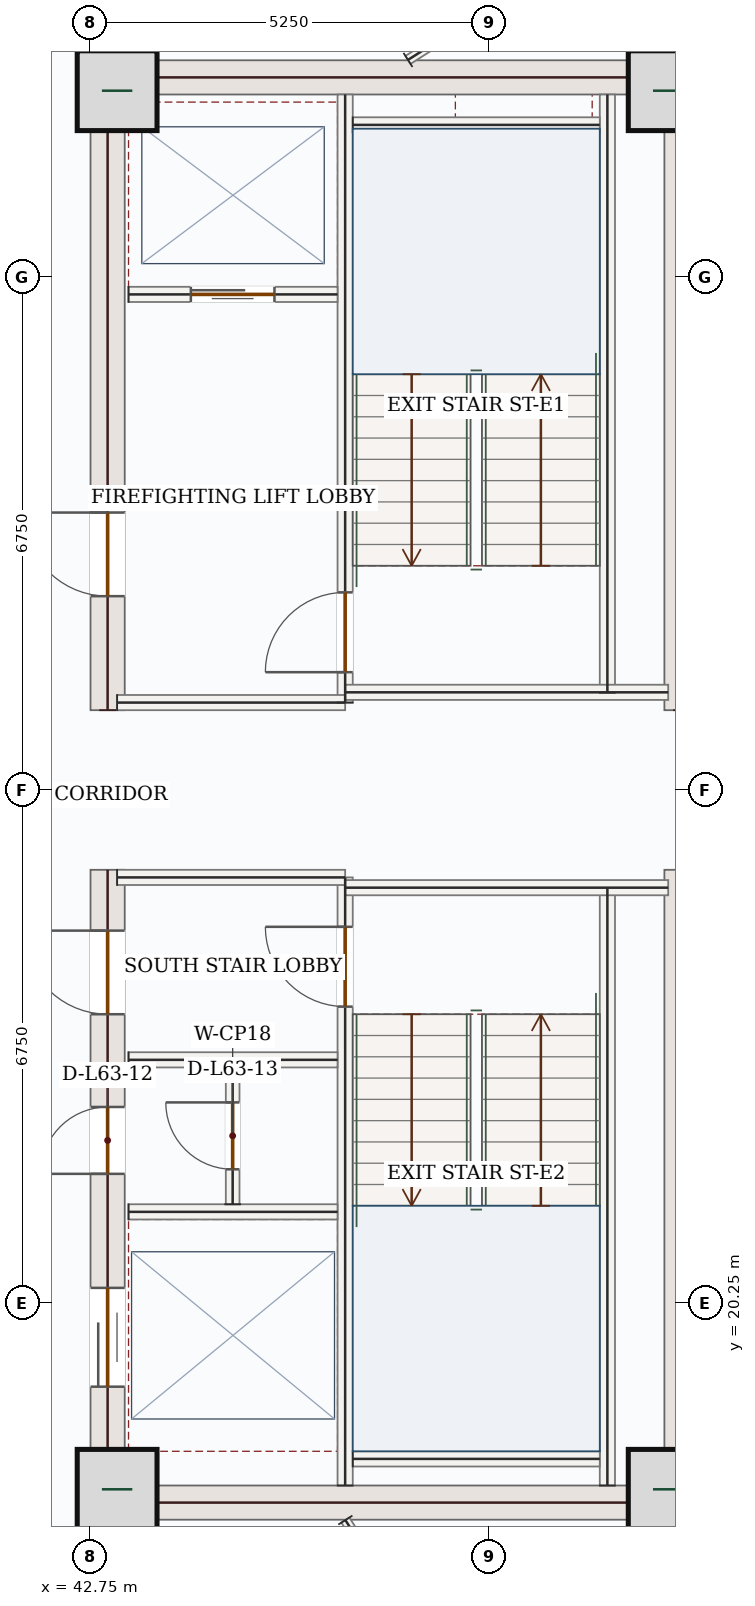
"""IFC4 building model, lengths in metres.
Left out: names, types, materials, properties, quantities, classifications, styles, units other than length and angle.
Written with IfcOpenShell. Run it as: python <this file> out.ifc"""

import sys

from ifc_helpers import new_model, si_unit, direction, frame, frame_2d, origin, origin_2d, place, context, subcontext, project, spatial, rectangle, extrude, source, transform, mapped, element, fill, save


model = new_model("IFC4")
c1 = context("Model", 3, precision=1e-05, world=origin(), true_north=direction((0.0, 1.0)))
c2 = subcontext(c1, "Body", "Model", "MODEL_VIEW")
j1 = project(units=[si_unit("LENGTHUNIT", "METRE"), si_unit("PLANEANGLEUNIT", "RADIAN")], contexts=[c1])
p1 = place(None, origin())
s1 = spatial("IfcSite", under=j1, at=p1, CompositionType="ELEMENT")
p2 = place(p1, origin())
s2 = spatial("IfcBuilding", under=s1, at=p2, CompositionType="ELEMENT")
p3 = place(p2, frame((0.0, 0.0, 265.35)))
s3 = spatial("IfcBuildingStorey", under=s2, at=p3, CompositionType="ELEMENT", Elevation=265.35)
p4 = place(p3, frame((42.975, 17.4, 0.0), z_axis=(0.0, 0.0, 1.0), x_axis=(0.0, 1.0, 0.0)))
e1 = element("IfcWall", 1, at=p4, inside=s3, PredefinedType="SHEAR", context=c2, shape_type="SweptSolid", body=[
    extrude(rectangle(XDim=8.55, YDim=0.45, at=frame_2d((4.275, 0.0))), origin(), (0.0, 0.0, 1.0), 3.5),
])
p5 = place(p4, frame((6.65, 0.0, 0.0)))
e2 = element("IfcOpeningElement", 2, at=p5, cuts=e1, PredefinedType="OPENING", context=c2, shape_type="SweptSolid", body=[
    extrude(rectangle(XDim=1.1, YDim=2.2, at=frame_2d((0.55, 1.1))), frame((0.0, 0.235, 0.0), z_axis=(0.0, -1.0, 0.0), x_axis=(1.0, 0.0, 0.0)), (0.0, 0.0, 1.0), 0.47),
])
p6 = place(p4, frame((1.75, 0.0, 0.0)))
e3 = element("IfcOpeningElement", 3, at=p6, cuts=e1, PredefinedType="OPENING", context=c2, shape_type="SweptSolid", body=[
    extrude(rectangle(XDim=1.3, YDim=2.2, at=frame_2d((0.65, 1.1))), frame((0.0, 0.235, 0.0), z_axis=(0.0, -1.0, 0.0), x_axis=(1.0, 0.0, 0.0)), (0.0, 0.0, 1.0), 0.47),
])
p7 = place(p4, frame((4.55, 0.0, 0.0)))
e4 = element("IfcOpeningElement", 4, at=p7, cuts=e1, PredefinedType="OPENING", context=c2, shape_type="SweptSolid", body=[
    extrude(rectangle(XDim=0.88, YDim=2.1, at=frame_2d((0.44, 1.05))), frame((0.0, 0.235, 0.0), z_axis=(0.0, -1.0, 0.0), x_axis=(1.0, 0.0, 0.0)), (0.0, 0.0, 1.0), 0.47),
])
p8 = place(p3, frame((42.975, 28.05, 0.0), z_axis=(0.0, 0.0, 1.0), x_axis=(0.0, 1.0, 0.0)))
e5 = element("IfcWall", 5, at=p8, inside=s3, PredefinedType="SHEAR", context=c2, shape_type="SweptSolid", body=[
    extrude(rectangle(XDim=8.55, YDim=0.45, at=frame_2d((4.275, 0.0))), origin(), (0.0, 0.0, 1.0), 3.5),
])
p9 = place(p8, frame((1.5, 0.0, 0.0)))
e6 = element("IfcOpeningElement", 6, at=p9, cuts=e5, PredefinedType="OPENING", context=c2, shape_type="SweptSolid", body=[
    extrude(rectangle(XDim=1.1, YDim=2.2, at=frame_2d((0.55, 1.1))), frame((0.0, 0.235, 0.0), z_axis=(0.0, -1.0, 0.0), x_axis=(1.0, 0.0, 0.0)), (0.0, 0.0, 1.0), 0.47),
])
m1 = source(origin(), c2, "Body", "SweptSolid", [
    extrude(rectangle(XDim=8.55, YDim=0.45, at=frame_2d((4.275, 0.0))), origin(), (0.0, 0.0, 1.0), 3.5),
])
for number, where, z_axis, x_axis in (
    (7, (50.525, 17.4, 0.0), (0.0, 0.0, 1.0), (0.0, 1.0, 0.0)),
    (8, (50.525, 28.05, 0.0), (0.0, 0.0, 1.0), (0.0, 1.0, 0.0)),
):
    element("IfcWall", number, at=place(p3, frame(where, z_axis=z_axis, x_axis=x_axis)), inside=s3, PredefinedType="SHEAR", context=c2, shape_type="MappedRepresentation", body=[
        mapped(m1, transform((0.0, 0.0, 0.0), x_axis=(1.0, 0.0, 0.0), y_axis=(0.0, 1.0, 0.0), z_axis=(0.0, 0.0, 1.0), scale=1.0)),
    ])
m2 = source(origin(), c2, "Body", "SweptSolid", [
    extrude(rectangle(XDim=7.1, YDim=0.45, at=frame_2d((3.55, 0.0))), origin(), (0.0, 0.0, 1.0), 3.5),
])
for number, where, z_axis, x_axis in (
    (9, (43.2, 17.625, 0.0), (0.0, 0.0, 1.0), (1.0, 0.0, 0.0)),
    (10, (43.2, 36.375, 0.0), (0.0, 0.0, 1.0), (1.0, 0.0, 0.0)),
):
    element("IfcWall", number, at=place(p3, frame(where, z_axis=z_axis, x_axis=x_axis)), inside=s3, PredefinedType="SHEAR", context=c2, shape_type="MappedRepresentation", body=[
        mapped(m2, transform((0.0, 0.0, 0.0), x_axis=(1.0, 0.0, 0.0), y_axis=(0.0, 1.0, 0.0), z_axis=(0.0, 0.0, 1.0), scale=1.0)),
    ])
m3 = source(origin(), c2, "Body", "SweptSolid", [
    extrude(rectangle(XDim=1.05, YDim=1.05, at=origin_2d()), origin(), (0.0, 0.0, 1.0), 3.75),
])
for number, where, z_axis, x_axis in (
    (11, (43.1, 17.8, 0.0), (0.0, 0.0, 1.0), (1.0, 0.0, 0.0)),
    (12, (50.35, 17.8, 0.0), (0.0, 0.0, 1.0), (1.0, 0.0, 0.0)),
    (13, (43.1, 36.2, 0.0), (0.0, 0.0, 1.0), (1.0, 0.0, 0.0)),
    (14, (50.35, 36.2, 0.0), (0.0, 0.0, 1.0), (1.0, 0.0, 0.0)),
):
    element("IfcColumn", number, at=place(p3, frame(where, z_axis=z_axis, x_axis=x_axis)), inside=s3, PredefinedType="COLUMN", context=c2, shape_type="MappedRepresentation", body=[
        mapped(m3, transform((0.0, 0.0, 0.0), x_axis=(1.0, 0.0, 0.0), y_axis=(0.0, 1.0, 0.0), z_axis=(0.0, 0.0, 1.0), scale=1.0)),
    ])
m4 = source(origin(), c2, "Body", "SweptSolid", [
    extrude(rectangle(XDim=7.87, YDim=0.2, at=frame_2d((3.935, 0.0))), origin(), (0.0, 0.0, 1.0), 3.5),
])
for number, where, z_axis, x_axis in (
    (15, (49.55, 17.85, 0.0), (0.0, 0.0, 1.0), (0.0, 1.0, 0.0)),
    (16, (49.55, 28.28, 0.0), (0.0, 0.0, 1.0), (0.0, 1.0, 0.0)),
):
    element("IfcWall", number, at=place(p3, frame(where, z_axis=z_axis, x_axis=x_axis)), inside=s3, PredefinedType="SOLIDWALL", context=c2, shape_type="MappedRepresentation", body=[
        mapped(m4, transform((0.0, 0.0, 0.0), x_axis=(1.0, 0.0, 0.0), y_axis=(0.0, 1.0, 0.0), z_axis=(0.0, 0.0, 1.0), scale=1.0)),
    ])
p10 = place(p3, frame((46.1, 17.85, 0.0), z_axis=(0.0, 0.0, 1.0), x_axis=(0.0, 1.0, 0.0)))
e17 = element("IfcWall", 17, at=p10, inside=s3, PredefinedType="SOLIDWALL", context=c2, shape_type="SweptSolid", body=[
    extrude(rectangle(XDim=8.0, YDim=0.2, at=frame_2d((4.0, 0.0))), origin(), (0.0, 0.0, 1.0), 3.5),
])
p11 = place(p10, frame((6.3, 0.0, 0.0)))
e18 = element("IfcOpeningElement", 18, at=p11, cuts=e17, PredefinedType="OPENING", context=c2, shape_type="SweptSolid", body=[
    extrude(rectangle(XDim=1.05, YDim=2.15, at=frame_2d((0.525, 1.075))), frame((0.0, 0.11, 0.0), z_axis=(0.0, -1.0, 0.0), x_axis=(1.0, 0.0, 0.0)), (0.0, 0.0, 1.0), 0.22),
])
p12 = place(p3, frame((46.1, 28.15, 0.0), z_axis=(0.0, 0.0, 1.0), x_axis=(0.0, 1.0, 0.0)))
e19 = element("IfcWall", 19, at=p12, inside=s3, PredefinedType="SOLIDWALL", context=c2, shape_type="SweptSolid", body=[
    extrude(rectangle(XDim=8.0, YDim=0.2, at=frame_2d((4.0, 0.0))), origin(), (0.0, 0.0, 1.0), 3.5),
])
p13 = place(p12, frame((0.4, 0.0, 0.0)))
e20 = element("IfcOpeningElement", 20, at=p13, cuts=e19, PredefinedType="OPENING", context=c2, shape_type="SweptSolid", body=[
    extrude(rectangle(XDim=1.05, YDim=2.15, at=frame_2d((0.525, 1.075))), frame((0.0, 0.11, 0.0), z_axis=(0.0, -1.0, 0.0), x_axis=(1.0, 0.0, 0.0)), (0.0, 0.0, 1.0), 0.22),
])
m5 = source(origin(), c2, "Body", "SweptSolid", [
    extrude(rectangle(XDim=3.0, YDim=0.2, at=frame_2d((1.5, 0.0))), origin(), (0.0, 0.0, 1.0), 3.5),
])
p14 = place(p3, frame((43.1, 25.85, 0.0), z_axis=(0.0, 0.0, 1.0), x_axis=(1.0, 0.0, 0.0)))
e21 = element("IfcWall", 21, at=p14, inside=s3, PredefinedType="SOLIDWALL", context=c2, shape_type="MappedRepresentation", body=[
    mapped(m5, transform((0.0, 0.0, 0.0), x_axis=(1.0, 0.0, 0.0), y_axis=(0.0, 1.0, 0.0), z_axis=(0.0, 0.0, 1.0), scale=1.0)),
])
m6 = source(origin(), c2, "Body", "SweptSolid", [
    extrude(rectangle(XDim=4.25, YDim=0.2, at=frame_2d((2.125, 0.0))), origin(), (0.0, 0.0, 1.0), 3.5),
])
p15 = place(p3, frame((46.1, 25.715, 0.0), z_axis=(0.0, 0.0, 1.0), x_axis=(1.0, 0.0, 0.0)))
e22 = element("IfcWall", 22, at=p15, inside=s3, PredefinedType="SOLIDWALL", context=c2, shape_type="MappedRepresentation", body=[
    mapped(m6, transform((0.0, 0.0, 0.0), x_axis=(1.0, 0.0, 0.0), y_axis=(0.0, 1.0, 0.0), z_axis=(0.0, 0.0, 1.0), scale=1.0)),
])
p16 = place(p3, frame((43.1, 28.15, 0.0), z_axis=(0.0, 0.0, 1.0), x_axis=(1.0, 0.0, 0.0)))
e23 = element("IfcWall", 23, at=p16, inside=s3, PredefinedType="SOLIDWALL", context=c2, shape_type="MappedRepresentation", body=[
    mapped(m5, transform((0.0, 0.0, 0.0), x_axis=(1.0, 0.0, 0.0), y_axis=(0.0, 1.0, 0.0), z_axis=(0.0, 0.0, 1.0), scale=1.0)),
])
p17 = place(p3, frame((46.1, 28.285, 0.0), z_axis=(0.0, 0.0, 1.0), x_axis=(1.0, 0.0, 0.0)))
e24 = element("IfcWall", 24, at=p17, inside=s3, PredefinedType="SOLIDWALL", context=c2, shape_type="MappedRepresentation", body=[
    mapped(m6, transform((0.0, 0.0, 0.0), x_axis=(1.0, 0.0, 0.0), y_axis=(0.0, 1.0, 0.0), z_axis=(0.0, 0.0, 1.0), scale=1.0)),
])
m7 = source(origin(), c2, "Body", "SweptSolid", [
    extrude(rectangle(XDim=3.25, YDim=0.2, at=frame_2d((1.625, 0.0))), origin(), (0.0, 0.0, 1.0), 3.5),
])
for number, where, z_axis, x_axis in (
    (25, (46.2, 35.75, 0.0), (0.0, 0.0, 1.0), (1.0, 0.0, 0.0)),
    (26, (46.2, 18.2, 0.0), (0.0, 0.0, 1.0), (1.0, 0.0, 0.0)),
):
    element("IfcWall", number, at=place(p3, frame(where, z_axis=z_axis, x_axis=x_axis)), inside=s3, PredefinedType="SOLIDWALL", context=c2, shape_type="MappedRepresentation", body=[
        mapped(m7, transform((0.0, 0.0, 0.0), x_axis=(1.0, 0.0, 0.0), y_axis=(0.0, 1.0, 0.0), z_axis=(0.0, 0.0, 1.0), scale=1.0)),
    ])
p18 = place(p3, frame((43.25, 33.52, 0.0), z_axis=(0.0, 0.0, 1.0), x_axis=(1.0, 0.0, 0.0)))
e27 = element("IfcWall", 27, at=p18, inside=s3, PredefinedType="SOLIDWALL", context=c2, shape_type="SweptSolid", body=[
    extrude(rectangle(XDim=2.75, YDim=0.2, at=frame_2d((1.375, 0.0))), origin(), (0.0, 0.0, 1.0), 3.5),
])
p19 = place(p18, frame((0.82, 0.0, 0.0)))
e28 = element("IfcOpeningElement", 28, at=p19, cuts=e27, PredefinedType="OPENING", context=c2, shape_type="SweptSolid", body=[
    extrude(rectangle(XDim=1.1, YDim=2.15, at=frame_2d((0.55, 1.075))), frame((0.0, 0.11, 0.0), z_axis=(0.0, -1.0, 0.0), x_axis=(1.0, 0.0, 0.0)), (0.0, 0.0, 1.0), 0.22),
])
m8 = source(origin(), c2, "Body", "SweptSolid", [
    extrude(rectangle(XDim=2.75, YDim=0.2, at=frame_2d((1.375, 0.0))), origin(), (0.0, 0.0, 1.0), 3.5),
])
for number, where, z_axis, x_axis in (
    (29, (43.25, 23.45, 0.0), (0.0, 0.0, 1.0), (1.0, 0.0, 0.0)),
    (30, (43.25, 21.45, 0.0), (0.0, 0.0, 1.0), (1.0, 0.0, 0.0)),
):
    element("IfcWall", number, at=place(p3, frame(where, z_axis=z_axis, x_axis=x_axis)), inside=s3, PredefinedType="SOLIDWALL", context=c2, shape_type="MappedRepresentation", body=[
        mapped(m8, transform((0.0, 0.0, 0.0), x_axis=(1.0, 0.0, 0.0), y_axis=(0.0, 1.0, 0.0), z_axis=(0.0, 0.0, 1.0), scale=1.0)),
    ])
p20 = place(p3, frame((44.62, 21.55, 0.0), z_axis=(0.0, 0.0, 1.0), x_axis=(0.0, 1.0, 0.0)))
e31 = element("IfcWall", 31, at=p20, inside=s3, PredefinedType="PARTITIONING", context=c2, shape_type="SweptSolid", body=[
    extrude(rectangle(XDim=1.8, YDim=0.18, at=frame_2d((0.9, 0.0))), origin(), (0.0, 0.0, 1.0), 3.5),
])
p21 = place(p20, frame((0.46, 0.0, 0.0)))
e32 = element("IfcOpeningElement", 32, at=p21, cuts=e31, PredefinedType="OPENING", context=c2, shape_type="SweptSolid", body=[
    extrude(rectangle(XDim=0.88, YDim=2.1, at=frame_2d((0.44, 1.05))), frame((0.0, 0.1, 0.0), z_axis=(0.0, -1.0, 0.0), x_axis=(1.0, 0.0, 0.0)), (0.0, 0.0, 1.0), 0.2),
])
p22 = place(p3, frame((46.927, 36.605, 0.0), z_axis=(0.0, 0.0, 1.0), x_axis=(0.843398332862, 0.537288797693, 0.0)))
e33 = element("IfcWall", 33, at=p22, inside=s3, PredefinedType="PARTITIONING", context=c2, shape_type="SweptSolid", body=[
    extrude(rectangle(XDim=5.924, YDim=0.125, at=frame_2d((2.962, 0.0))), origin(), (0.0, 0.0, 1.0), 3.5),
])
p23 = place(p22, frame((2.487, 0.0, 0.0)))
e34 = element("IfcOpeningElement", 34, at=p23, cuts=e33, PredefinedType="OPENING", context=c2, shape_type="SweptSolid", body=[
    extrude(rectangle(XDim=0.95, YDim=2.15, at=frame_2d((0.475, 1.075))), frame((0.0, 0.073, 0.0), z_axis=(0.0, -1.0, 0.0), x_axis=(1.0, 0.0, 0.0)), (0.0, 0.0, 1.0), 0.145),
])
m9 = source(origin(), c2, "Body", "SweptSolid", [
    extrude(rectangle(XDim=5.726, YDim=0.125, at=frame_2d((2.863, 0.0))), origin(), (0.0, 0.0, 1.0), 3.5),
])
p24 = place(p3, frame((46.103, 17.395, 0.0), z_axis=(0.0, 0.0, 1.0), x_axis=(0.537333366959, -0.843369938255, 0.0)))
e35 = element("IfcWall", 35, at=p24, inside=s3, PredefinedType="PARTITIONING", context=c2, shape_type="MappedRepresentation", body=[
    mapped(m9, transform((0.0, 0.0, 0.0), x_axis=(1.0, 0.0, 0.0), y_axis=(0.0, 1.0, 0.0), z_axis=(0.0, 0.0, 1.0), scale=1.0)),
])
m10 = source(origin(), c2, "Body", "SweptSolid", [
    extrude(rectangle(XDim=1.05, YDim=2.15, at=frame_2d((0.525, 1.075))), frame((0.0, 0.025, 0.0), z_axis=(0.0, -1.0, 0.0), x_axis=(1.0, 0.0, 0.0)), (0.0, 0.0, 1.0), 0.05),
])
p25 = place(p13, origin())
e36 = element("IfcDoor", 36, at=p25, inside=s3, OperationType="SINGLE_SWING_LEFT", PredefinedType="DOOR", context=c2, shape_type="MappedRepresentation", body=[
    mapped(m10, transform((0.0, 0.0, 0.0), x_axis=(1.0, 0.0, 0.0), y_axis=(0.0, 1.0, 0.0), z_axis=(0.0, 0.0, 1.0), scale=1.0)),
])
fill(e20, e36)
p26 = place(p11, origin())
e37 = element("IfcDoor", 37, at=p26, inside=s3, OperationType="SINGLE_SWING_RIGHT", PredefinedType="DOOR", context=c2, shape_type="MappedRepresentation", body=[
    mapped(m10, transform((0.0, 0.0, 0.0), x_axis=(1.0, 0.0, 0.0), y_axis=(0.0, 1.0, 0.0), z_axis=(0.0, 0.0, 1.0), scale=1.0)),
])
fill(e18, e37)
m11 = source(origin(), c2, "Body", "SweptSolid", [
    extrude(rectangle(XDim=1.1, YDim=2.15, at=frame_2d((0.55, 1.075))), frame((0.0, 0.025, 0.0), z_axis=(0.0, -1.0, 0.0), x_axis=(1.0, 0.0, 0.0)), (0.0, 0.0, 1.0), 0.05),
])
p27 = place(p19, origin())
e38 = element("IfcDoor", 38, at=p27, inside=s3, OperationType="DOUBLE_DOOR_SLIDING", PredefinedType="DOOR", context=c2, shape_type="MappedRepresentation", body=[
    mapped(m11, transform((0.0, 0.0, 0.0), x_axis=(1.0, 0.0, 0.0), y_axis=(0.0, 1.0, 0.0), z_axis=(0.0, 0.0, 1.0), scale=1.0)),
])
fill(e28, e38)
m12 = source(origin(), c2, "Body", "SweptSolid", [
    extrude(rectangle(XDim=1.1, YDim=2.2, at=frame_2d((0.55, 1.1))), frame((0.0, 0.025, 0.0), z_axis=(0.0, -1.0, 0.0), x_axis=(1.0, 0.0, 0.0)), (0.0, 0.0, 1.0), 0.05),
])
p28 = place(p9, origin())
e39 = element("IfcDoor", 39, at=p28, inside=s3, OperationType="SINGLE_SWING_RIGHT", PredefinedType="DOOR", context=c2, shape_type="MappedRepresentation", body=[
    mapped(m12, transform((0.0, 0.0, 0.0), x_axis=(1.0, 0.0, 0.0), y_axis=(0.0, 1.0, 0.0), z_axis=(0.0, 0.0, 1.0), scale=1.0)),
])
fill(e6, e39)
p29 = place(p5, origin())
e40 = element("IfcDoor", 40, at=p29, inside=s3, OperationType="SINGLE_SWING_RIGHT", PredefinedType="DOOR", context=c2, shape_type="MappedRepresentation", body=[
    mapped(m12, transform((0.0, 0.0, 0.0), x_axis=(1.0, 0.0, 0.0), y_axis=(0.0, 1.0, 0.0), z_axis=(0.0, 0.0, 1.0), scale=1.0)),
])
fill(e2, e40)
m13 = source(origin(), c2, "Body", "SweptSolid", [
    extrude(rectangle(XDim=1.3, YDim=2.2, at=frame_2d((0.65, 1.1))), frame((0.0, 0.025, 0.0), z_axis=(0.0, -1.0, 0.0), x_axis=(1.0, 0.0, 0.0)), (0.0, 0.0, 1.0), 0.05),
])
p30 = place(p6, origin())
e41 = element("IfcDoor", 41, at=p30, inside=s3, OperationType="DOUBLE_DOOR_SLIDING", PredefinedType="DOOR", context=c2, shape_type="MappedRepresentation", body=[
    mapped(m13, transform((0.0, 0.0, 0.0), x_axis=(1.0, 0.0, 0.0), y_axis=(0.0, 1.0, 0.0), z_axis=(0.0, 0.0, 1.0), scale=1.0)),
])
fill(e3, e41)
m14 = source(origin(), c2, "Body", "SweptSolid", [
    extrude(rectangle(XDim=0.88, YDim=2.1, at=frame_2d((0.44, 1.05))), frame((0.0, 0.025, 0.0), z_axis=(0.0, -1.0, 0.0), x_axis=(1.0, 0.0, 0.0)), (0.0, 0.0, 1.0), 0.05),
])
p31 = place(p7, origin())
e42 = element("IfcDoor", 42, at=p31, inside=s3, OperationType="SINGLE_SWING_LEFT", PredefinedType="DOOR", context=c2, shape_type="MappedRepresentation", body=[
    mapped(m14, transform((0.0, 0.0, 0.0), x_axis=(1.0, 0.0, 0.0), y_axis=(0.0, 1.0, 0.0), z_axis=(0.0, 0.0, 1.0), scale=1.0)),
])
fill(e4, e42)
p32 = place(p21, origin())
e43 = element("IfcDoor", 43, at=p32, inside=s3, OperationType="SINGLE_SWING_RIGHT", PredefinedType="DOOR", context=c2, shape_type="MappedRepresentation", body=[
    mapped(m14, transform((0.0, 0.0, 0.0), x_axis=(1.0, 0.0, 0.0), y_axis=(0.0, 1.0, 0.0), z_axis=(0.0, 0.0, 1.0), scale=1.0)),
])
fill(e32, e43)
save(model, sys.argv[1])
